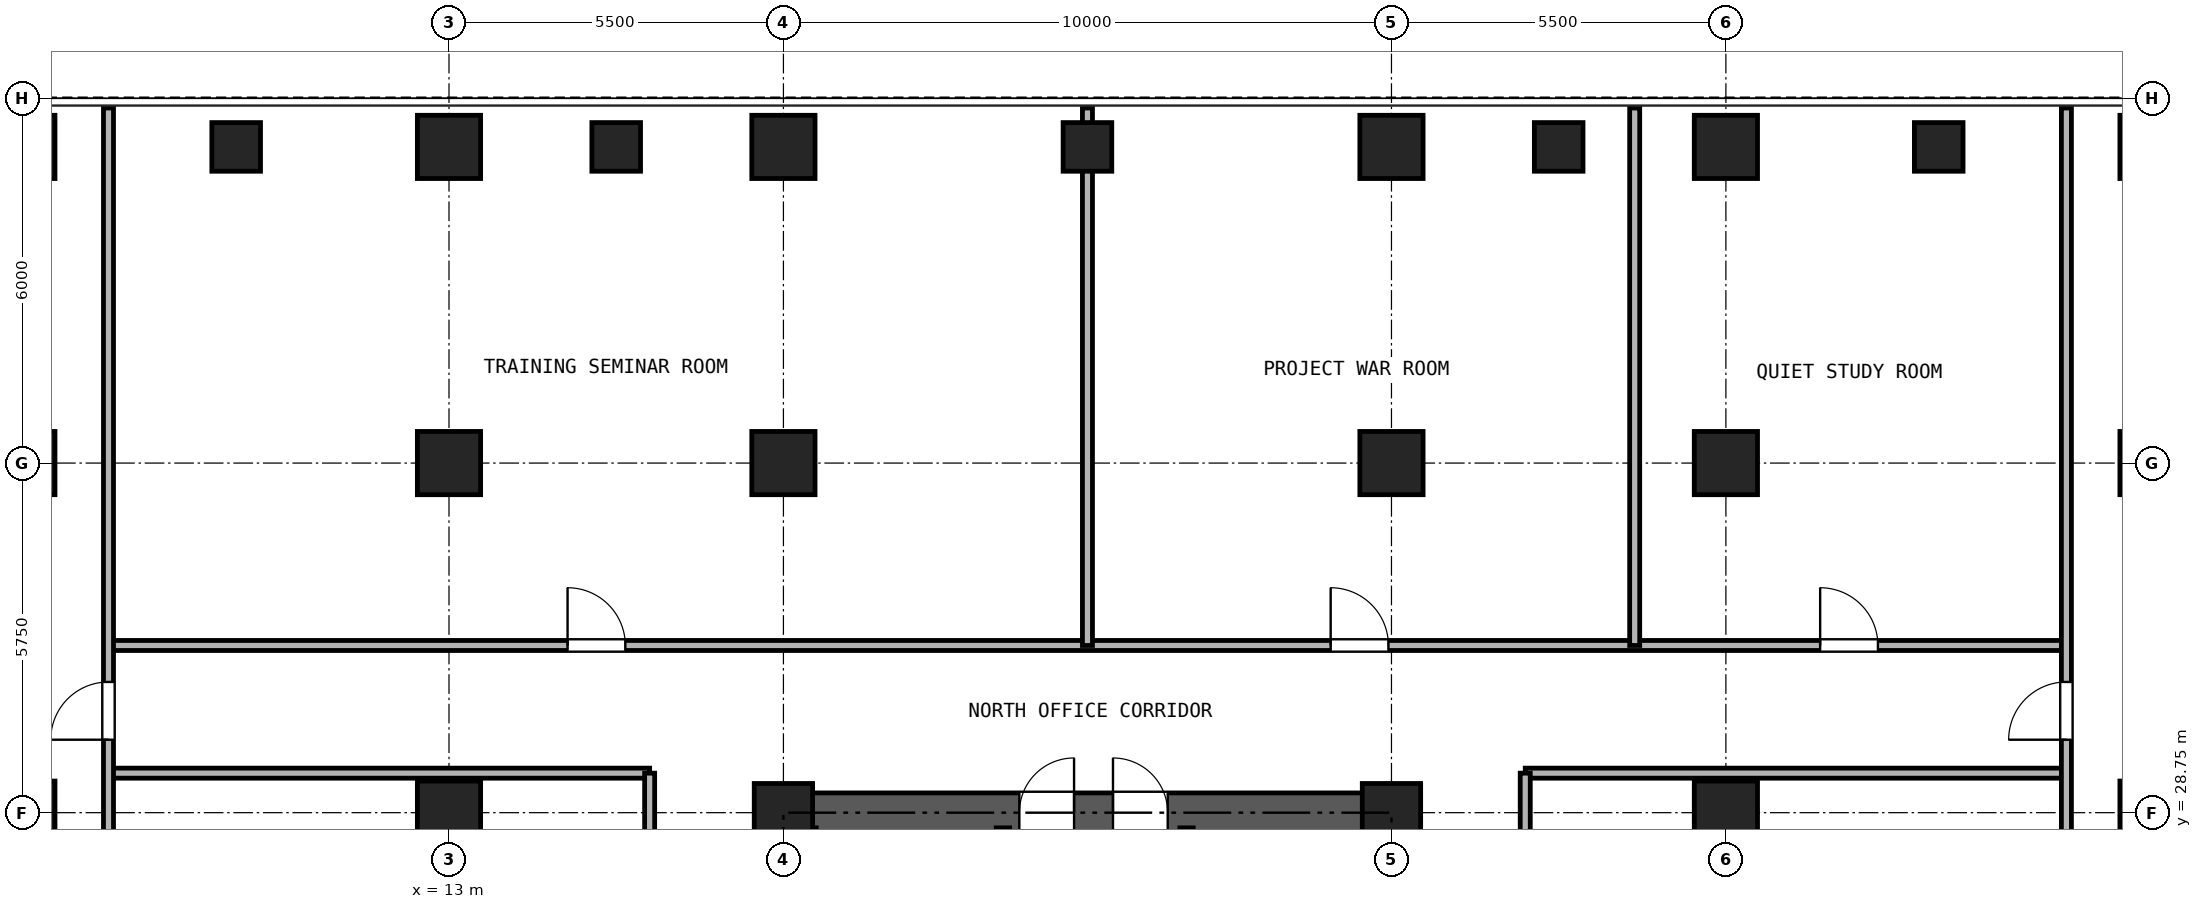
"""IFC4 building model, lengths in metres.
Left out: names, types, materials, properties, quantities, classifications, styles, units other than length and angle.
Written with IfcOpenShell. Run it as: python <this file> out.ifc"""

import sys

from ifc_helpers import new_model, si_unit, direction, frame, frame_2d, origin, origin_2d, place, context, subcontext, project, spatial, rectangle, hollow_rectangle, extrude, source, transform, mapped, element, fill, save


model = new_model("IFC4")
c1 = context("Model", 3, precision=1e-05, world=origin(), true_north=direction((0.0, 1.0)))
c2 = subcontext(c1, "Body", "Model", "MODEL_VIEW")
j1 = project(units=[si_unit("LENGTHUNIT", "METRE"), si_unit("PLANEANGLEUNIT", "RADIAN")], contexts=[c1])
p1 = place(None, origin())
s1 = spatial("IfcSite", under=j1, at=p1, CompositionType="ELEMENT")
p2 = place(p1, origin())
s2 = spatial("IfcBuilding", under=s1, at=p2, CompositionType="ELEMENT")
p3 = place(p2, frame((0.0, 0.0, 40.5)))
s3 = spatial("IfcBuildingStorey", under=s2, at=p3, CompositionType="ELEMENT", Elevation=40.5)
m1 = source(origin(), c2, "Body", "SweptSolid", [
    extrude(hollow_rectangle(XDim=1.04, YDim=1.04, WallThickness=0.065, at=origin_2d()), origin(), (0.0, 0.0, 1.0), 3.32),
])
for number, where, z_axis, x_axis in (
    (1, (6.0, 39.7, 0.0), (0.0, 0.0, 1.0), (1.0, 0.0, 0.0)),
    (2, (13.0, 39.7, 0.0), (0.0, 0.0, 1.0), (1.0, 0.0, 0.0)),
    (3, (18.5, 39.7, 0.0), (0.0, 0.0, 1.0), (1.0, 0.0, 0.0)),
    (4, (28.5, 39.7, 0.0), (0.0, 0.0, 1.0), (1.0, 0.0, 0.0)),
    (5, (34.0, 39.7, 0.0), (0.0, 0.0, 1.0), (1.0, 0.0, 0.0)),
    (6, (41.0, 39.7, 0.0), (0.0, 0.0, 1.0), (1.0, 0.0, 0.0)),
    (7, (6.0, 28.75, 0.0), (0.0, 0.0, 1.0), (1.0, 0.0, 0.0)),
    (8, (6.0, 34.5, 0.0), (0.0, 0.0, 1.0), (1.0, 0.0, 0.0)),
    (9, (13.0, 28.75, 0.0), (0.0, 0.0, 1.0), (1.0, 0.0, 0.0)),
    (10, (13.0, 34.5, 0.0), (0.0, 0.0, 1.0), (1.0, 0.0, 0.0)),
):
    element("IfcColumn", number, at=place(p3, frame(where, z_axis=z_axis, x_axis=x_axis)), inside=s3, PredefinedType="COLUMN", context=c2, shape_type="MappedRepresentation", body=[
        mapped(m1, transform((0.0, 0.0, 0.0), x_axis=(1.0, 0.0, 0.0), y_axis=(0.0, 1.0, 0.0), z_axis=(0.0, 0.0, 1.0), scale=1.0)),
    ])
m2 = source(origin(), c2, "Body", "SweptSolid", [
    extrude(hollow_rectangle(XDim=0.96, YDim=0.96, WallThickness=0.06, at=origin_2d()), origin(), (0.0, 0.0, 1.0), 3.32),
])
p4 = place(p3, frame((18.5, 28.75, 0.0), z_axis=(0.0, 0.0, 1.0), x_axis=(1.0, 0.0, 0.0)))
e11 = element("IfcColumn", 11, at=p4, inside=s3, PredefinedType="COLUMN", context=c2, shape_type="MappedRepresentation", body=[
    mapped(m2, transform((0.0, 0.0, 0.0), x_axis=(1.0, 0.0, 0.0), y_axis=(0.0, 1.0, 0.0), z_axis=(0.0, 0.0, 1.0), scale=1.0)),
])
p5 = place(p3, frame((18.5, 34.5, 0.0), z_axis=(0.0, 0.0, 1.0), x_axis=(1.0, 0.0, 0.0)))
e12 = element("IfcColumn", 12, at=p5, inside=s3, PredefinedType="COLUMN", context=c2, shape_type="MappedRepresentation", body=[
    mapped(m1, transform((0.0, 0.0, 0.0), x_axis=(1.0, 0.0, 0.0), y_axis=(0.0, 1.0, 0.0), z_axis=(0.0, 0.0, 1.0), scale=1.0)),
])
p6 = place(p3, frame((28.5, 28.75, 0.0), z_axis=(0.0, 0.0, 1.0), x_axis=(1.0, 0.0, 0.0)))
e13 = element("IfcColumn", 13, at=p6, inside=s3, PredefinedType="COLUMN", context=c2, shape_type="MappedRepresentation", body=[
    mapped(m2, transform((0.0, 0.0, 0.0), x_axis=(1.0, 0.0, 0.0), y_axis=(0.0, 1.0, 0.0), z_axis=(0.0, 0.0, 1.0), scale=1.0)),
])
for number, where, z_axis, x_axis in (
    (14, (28.5, 34.5, 0.0), (0.0, 0.0, 1.0), (1.0, 0.0, 0.0)),
    (15, (34.0, 28.75, 0.0), (0.0, 0.0, 1.0), (1.0, 0.0, 0.0)),
    (16, (34.0, 34.5, 0.0), (0.0, 0.0, 1.0), (1.0, 0.0, 0.0)),
    (17, (41.0, 28.75, 0.0), (0.0, 0.0, 1.0), (1.0, 0.0, 0.0)),
    (18, (41.0, 34.5, 0.0), (0.0, 0.0, 1.0), (1.0, 0.0, 0.0)),
):
    element("IfcColumn", number, at=place(p3, frame(where, z_axis=z_axis, x_axis=x_axis)), inside=s3, PredefinedType="COLUMN", context=c2, shape_type="MappedRepresentation", body=[
        mapped(m1, transform((0.0, 0.0, 0.0), x_axis=(1.0, 0.0, 0.0), y_axis=(0.0, 1.0, 0.0), z_axis=(0.0, 0.0, 1.0), scale=1.0)),
    ])
m3 = source(origin(), c2, "Body", "SweptSolid", [
    extrude(hollow_rectangle(XDim=0.8, YDim=0.8, WallThickness=0.045, at=origin_2d()), origin(), (0.0, 0.0, 1.0), 3.32),
])
for number, where, z_axis, x_axis in (
    (19, (9.5, 39.7, 0.0), (0.0, 0.0, 1.0), (1.0, 0.0, 0.0)),
    (20, (15.75, 39.7, 0.0), (0.0, 0.0, 1.0), (1.0, 0.0, 0.0)),
    (21, (23.5, 39.7, 0.0), (0.0, 0.0, 1.0), (1.0, 0.0, 0.0)),
    (22, (31.25, 39.7, 0.0), (0.0, 0.0, 1.0), (1.0, 0.0, 0.0)),
    (23, (37.5, 39.7, 0.0), (0.0, 0.0, 1.0), (1.0, 0.0, 0.0)),
):
    element("IfcColumn", number, at=place(p3, frame(where, z_axis=z_axis, x_axis=x_axis)), inside=s3, PredefinedType="COLUMN", context=c2, shape_type="MappedRepresentation", body=[
        mapped(m3, transform((0.0, 0.0, 0.0), x_axis=(1.0, 0.0, 0.0), y_axis=(0.0, 1.0, 0.0), z_axis=(0.0, 0.0, 1.0), scale=1.0)),
    ])
p7 = place(p3, frame((18.175, 28.75, 0.0), z_axis=(0.0, 0.0, 1.0), x_axis=(1.0, 0.0, 0.0)))
e24 = element("IfcWall", 24, at=p7, inside=s3, PredefinedType="SHEAR", context=c2, shape_type="SweptSolid", body=[
    extrude(rectangle(XDim=10.65, YDim=0.65, at=frame_2d((5.325, 0.0))), origin(), (0.0, 0.0, 1.0), 3.32),
])
p8 = place(p7, frame((4.205, 0.0, 0.0)))
e25 = element("IfcOpeningElement", 25, at=p8, cuts=e24, PredefinedType="OPENING", context=c2, shape_type="SweptSolid", body=[
    extrude(rectangle(XDim=0.9, YDim=2.05, at=frame_2d((0.45, 1.025))), frame((0.0, 0.335, 0.0), z_axis=(0.0, -1.0, 0.0), x_axis=(1.0, 0.0, 0.0)), (0.0, 0.0, 1.0), 0.67),
])
p9 = place(p7, frame((5.745, 0.0, 0.0)))
e26 = element("IfcOpeningElement", 26, at=p9, cuts=e24, PredefinedType="OPENING", context=c2, shape_type="SweptSolid", body=[
    extrude(rectangle(XDim=0.9, YDim=2.05, at=frame_2d((0.45, 1.025))), frame((0.0, 0.335, 0.0), z_axis=(0.0, -1.0, 0.0), x_axis=(1.0, 0.0, 0.0)), (0.0, 0.0, 1.0), 0.67),
])
for number, where, z_axis, x_axis in (
    (27, (18.93, 21.39, 0.0), (0.0, 0.0, 1.0), (0.0, 1.0, 0.0)),
    (28, (22.11, 21.39, 0.0), (0.0, 0.0, 1.0), (0.0, 1.0, 0.0)),
    (29, (25.13, 21.39, 0.0), (0.0, 0.0, 1.0), (0.0, 1.0, 0.0)),
):
    element("IfcWall", number, at=place(p3, frame(where, z_axis=z_axis, x_axis=x_axis)), inside=s3, PredefinedType="SOLIDWALL", context=c2, shape_type="SweptSolid", body=[
        extrude(rectangle(XDim=7.11, YDim=0.22, at=frame_2d((3.555, 0.0))), origin(), (0.0, 0.0, 1.0), 3.32),
    ])
p10 = place(p3, frame((7.4, 31.5, 0.0), z_axis=(0.0, 0.0, 1.0), x_axis=(1.0, 0.0, 0.0)))
e30 = element("IfcWall", 30, at=p10, inside=s3, PredefinedType="PARTITIONING", context=c2, shape_type="SweptSolid", body=[
    extrude(rectangle(XDim=32.2, YDim=0.165, at=frame_2d((16.1, 0.0))), origin(), (0.0, 0.0, 1.0), 2.898),
])
p11 = place(p10, frame((7.55, 0.0, 0.0)))
e31 = element("IfcOpeningElement", 31, at=p11, cuts=e30, PredefinedType="OPENING", context=c2, shape_type="SweptSolid", body=[
    extrude(rectangle(XDim=0.95, YDim=2.15, at=frame_2d((0.475, 1.075))), frame((0.0, 0.093, 0.0), z_axis=(0.0, -1.0, 0.0), x_axis=(1.0, 0.0, 0.0)), (0.0, 0.0, 1.0), 0.185),
])
p12 = place(p10, frame((20.1, 0.0, 0.0)))
e32 = element("IfcOpeningElement", 32, at=p12, cuts=e30, PredefinedType="OPENING", context=c2, shape_type="SweptSolid", body=[
    extrude(rectangle(XDim=0.95, YDim=2.15, at=frame_2d((0.475, 1.075))), frame((0.0, 0.093, 0.0), z_axis=(0.0, -1.0, 0.0), x_axis=(1.0, 0.0, 0.0)), (0.0, 0.0, 1.0), 0.185),
])
p13 = place(p10, frame((28.15, 0.0, 0.0)))
e33 = element("IfcOpeningElement", 33, at=p13, cuts=e30, PredefinedType="OPENING", context=c2, shape_type="SweptSolid", body=[
    extrude(rectangle(XDim=0.95, YDim=2.15, at=frame_2d((0.475, 1.075))), frame((0.0, 0.093, 0.0), z_axis=(0.0, -1.0, 0.0), x_axis=(1.0, 0.0, 0.0)), (0.0, 0.0, 1.0), 0.185),
])
for number, where, z_axis, x_axis in (
    (34, (7.4, 29.4, 0.0), (0.0, 0.0, 1.0), (1.0, 0.0, 0.0)),
    (35, (30.7, 29.4, 0.0), (0.0, 0.0, 1.0), (1.0, 0.0, 0.0)),
):
    element("IfcWall", number, at=place(p3, frame(where, z_axis=z_axis, x_axis=x_axis)), inside=s3, PredefinedType="PARTITIONING", context=c2, shape_type="SweptSolid", body=[
        extrude(rectangle(XDim=8.9, YDim=0.165, at=frame_2d((4.45, 0.0))), origin(), (0.0, 0.0, 1.0), 3.32),
    ])
p14 = place(p3, frame((16.3, 11.15, 0.0), z_axis=(0.0, 0.0, 1.0), x_axis=(0.0, 1.0, 0.0)))
e36 = element("IfcWall", 36, at=p14, inside=s3, PredefinedType="PARTITIONING", context=c2, shape_type="SweptSolid", body=[
    extrude(rectangle(XDim=18.25, YDim=0.165, at=frame_2d((9.125, 0.0))), origin(), (0.0, 0.0, 1.0), 3.32),
])
p15 = place(p14, frame((5.409, 0.0, 0.0)))
e37 = element("IfcOpeningElement", 37, at=p15, cuts=e36, PredefinedType="OPENING", context=c2, shape_type="SweptSolid", body=[
    extrude(rectangle(XDim=0.95, YDim=2.15, at=frame_2d((0.475, 1.075))), frame((0.0, 0.093, 0.0), z_axis=(0.0, -1.0, 0.0), x_axis=(1.0, 0.0, 0.0)), (0.0, 0.0, 1.0), 0.185),
])
p16 = place(p14, frame((14.534, 0.0, 0.0)))
e38 = element("IfcOpeningElement", 38, at=p16, cuts=e36, PredefinedType="OPENING", context=c2, shape_type="SweptSolid", body=[
    extrude(rectangle(XDim=0.95, YDim=2.15, at=frame_2d((0.475, 1.075))), frame((0.0, 0.093, 0.0), z_axis=(0.0, -1.0, 0.0), x_axis=(1.0, 0.0, 0.0)), (0.0, 0.0, 1.0), 0.185),
])
p17 = place(p3, frame((30.7, 11.15, 0.0), z_axis=(0.0, 0.0, 1.0), x_axis=(0.0, 1.0, 0.0)))
e39 = element("IfcWall", 39, at=p17, inside=s3, PredefinedType="PARTITIONING", context=c2, shape_type="SweptSolid", body=[
    extrude(rectangle(XDim=18.25, YDim=0.165, at=frame_2d((9.125, 0.0))), origin(), (0.0, 0.0, 1.0), 3.32),
])
p18 = place(p17, frame((8.625, 0.0, 0.0)))
e40 = element("IfcOpeningElement", 40, at=p18, cuts=e39, PredefinedType="OPENING", context=c2, shape_type="SweptSolid", body=[
    extrude(rectangle(XDim=0.95, YDim=2.15, at=frame_2d((0.475, 1.075))), frame((0.0, 0.093, 0.0), z_axis=(0.0, -1.0, 0.0), x_axis=(1.0, 0.0, 0.0)), (0.0, 0.0, 1.0), 0.185),
])
p19 = place(p3, frame((7.4, 0.16, 0.0), z_axis=(0.0, 0.0, 1.0), x_axis=(0.0, 1.0, 0.0)))
e41 = element("IfcWall", 41, at=p19, inside=s3, PredefinedType="PARTITIONING", context=c2, shape_type="SweptSolid", body=[
    extrude(rectangle(XDim=40.18, YDim=0.165, at=frame_2d((20.09, 0.0))), origin(), (0.0, 0.0, 1.0), 3.32),
])
p20 = place(p19, frame((9.44, 0.0, 0.0)))
e42 = element("IfcOpeningElement", 42, at=p20, cuts=e41, PredefinedType="OPENING", context=c2, shape_type="SweptSolid", body=[
    extrude(rectangle(XDim=0.95, YDim=2.15, at=frame_2d((0.475, 1.075))), frame((0.0, 0.093, 0.0), z_axis=(0.0, -1.0, 0.0), x_axis=(1.0, 0.0, 0.0)), (0.0, 0.0, 1.0), 0.185),
])
p21 = place(p19, frame((29.79, 0.0, 0.0)))
e43 = element("IfcOpeningElement", 43, at=p21, cuts=e41, PredefinedType="OPENING", context=c2, shape_type="SweptSolid", body=[
    extrude(rectangle(XDim=0.95, YDim=2.15, at=frame_2d((0.475, 1.075))), frame((0.0, 0.093, 0.0), z_axis=(0.0, -1.0, 0.0), x_axis=(1.0, 0.0, 0.0)), (0.0, 0.0, 1.0), 0.185),
])
p22 = place(p3, frame((39.6, 0.16, 0.0), z_axis=(0.0, 0.0, 1.0), x_axis=(0.0, 1.0, 0.0)))
e44 = element("IfcWall", 44, at=p22, inside=s3, PredefinedType="PARTITIONING", context=c2, shape_type="SweptSolid", body=[
    extrude(rectangle(XDim=40.18, YDim=0.165, at=frame_2d((20.09, 0.0))), origin(), (0.0, 0.0, 1.0), 3.32),
])
p23 = place(p22, frame((9.44, 0.0, 0.0)))
e45 = element("IfcOpeningElement", 45, at=p23, cuts=e44, PredefinedType="OPENING", context=c2, shape_type="SweptSolid", body=[
    extrude(rectangle(XDim=0.95, YDim=2.15, at=frame_2d((0.475, 1.075))), frame((0.0, 0.093, 0.0), z_axis=(0.0, -1.0, 0.0), x_axis=(1.0, 0.0, 0.0)), (0.0, 0.0, 1.0), 0.185),
])
p24 = place(p22, frame((29.79, 0.0, 0.0)))
e46 = element("IfcOpeningElement", 46, at=p24, cuts=e44, PredefinedType="OPENING", context=c2, shape_type="SweptSolid", body=[
    extrude(rectangle(XDim=0.95, YDim=2.15, at=frame_2d((0.475, 1.075))), frame((0.0, 0.093, 0.0), z_axis=(0.0, -1.0, 0.0), x_axis=(1.0, 0.0, 0.0)), (0.0, 0.0, 1.0), 0.185),
])
for number, where, z_axis, x_axis in (
    (47, (23.5, 31.5, 0.0), (0.0, 0.0, 1.0), (0.0, 1.0, 0.0)),
    (48, (32.5, 31.5, 0.0), (0.0, 0.0, 1.0), (0.0, 1.0, 0.0)),
):
    element("IfcWall", number, at=place(p3, frame(where, z_axis=z_axis, x_axis=x_axis)), inside=s3, PredefinedType="PARTITIONING", context=c2, shape_type="SweptSolid", body=[
        extrude(rectangle(XDim=8.84, YDim=0.165, at=frame_2d((4.42, 0.0))), origin(), (0.0, 0.0, 1.0), 3.32),
    ])
p25 = place(p8, origin())
e49 = element("IfcDoor", 49, at=p25, inside=s3, OperationType="SINGLE_SWING_RIGHT", PredefinedType="DOOR", context=c2, shape_type="SweptSolid", body=[
    extrude(rectangle(XDim=0.9, YDim=2.05, at=frame_2d((0.45, 1.025))), frame((0.0, 0.025, 0.0), z_axis=(0.0, -1.0, 0.0), x_axis=(1.0, 0.0, 0.0)), (0.0, 0.0, 1.0), 0.05),
])
fill(e25, e49)
p26 = place(p9, origin())
e50 = element("IfcDoor", 50, at=p26, inside=s3, OperationType="SINGLE_SWING_LEFT", PredefinedType="DOOR", context=c2, shape_type="SweptSolid", body=[
    extrude(rectangle(XDim=0.9, YDim=2.05, at=frame_2d((0.45, 1.025))), frame((0.0, 0.025, 0.0), z_axis=(0.0, -1.0, 0.0), x_axis=(1.0, 0.0, 0.0)), (0.0, 0.0, 1.0), 0.05),
])
fill(e26, e50)
p27 = place(p11, origin())
e51 = element("IfcDoor", 51, at=p27, inside=s3, OperationType="SINGLE_SWING_LEFT", PredefinedType="DOOR", context=c2, shape_type="SweptSolid", body=[
    extrude(rectangle(XDim=0.95, YDim=2.15, at=frame_2d((0.475, 1.075))), frame((0.0, 0.025, 0.0), z_axis=(0.0, -1.0, 0.0), x_axis=(1.0, 0.0, 0.0)), (0.0, 0.0, 1.0), 0.05),
])
fill(e31, e51)
p28 = place(p12, origin())
e52 = element("IfcDoor", 52, at=p28, inside=s3, OperationType="SINGLE_SWING_LEFT", PredefinedType="DOOR", context=c2, shape_type="SweptSolid", body=[
    extrude(rectangle(XDim=0.95, YDim=2.15, at=frame_2d((0.475, 1.075))), frame((0.0, 0.025, 0.0), z_axis=(0.0, -1.0, 0.0), x_axis=(1.0, 0.0, 0.0)), (0.0, 0.0, 1.0), 0.05),
])
fill(e32, e52)
p29 = place(p13, origin())
e53 = element("IfcDoor", 53, at=p29, inside=s3, OperationType="SINGLE_SWING_LEFT", PredefinedType="DOOR", context=c2, shape_type="SweptSolid", body=[
    extrude(rectangle(XDim=0.95, YDim=2.15, at=frame_2d((0.475, 1.075))), frame((0.0, 0.025, 0.0), z_axis=(0.0, -1.0, 0.0), x_axis=(1.0, 0.0, 0.0)), (0.0, 0.0, 1.0), 0.05),
])
fill(e33, e53)
p30 = place(p21, frame((0.95, 0.0, 0.0), z_axis=(0.0, 0.0, 1.0), x_axis=(-1.0, 0.0, 0.0)))
e54 = element("IfcDoor", 54, at=p30, inside=s3, OperationType="SINGLE_SWING_LEFT", PredefinedType="DOOR", context=c2, shape_type="SweptSolid", body=[
    extrude(rectangle(XDim=0.95, YDim=2.15, at=frame_2d((0.475, 1.075))), frame((0.0, 0.025, 0.0), z_axis=(0.0, -1.0, 0.0), x_axis=(1.0, 0.0, 0.0)), (0.0, 0.0, 1.0), 0.05),
])
fill(e43, e54)
p31 = place(p24, origin())
e55 = element("IfcDoor", 55, at=p31, inside=s3, OperationType="SINGLE_SWING_LEFT", PredefinedType="DOOR", context=c2, shape_type="SweptSolid", body=[
    extrude(rectangle(XDim=0.95, YDim=2.15, at=frame_2d((0.475, 1.075))), frame((0.0, 0.025, 0.0), z_axis=(0.0, -1.0, 0.0), x_axis=(1.0, 0.0, 0.0)), (0.0, 0.0, 1.0), 0.05),
])
fill(e46, e55)
save(model, sys.argv[1])
